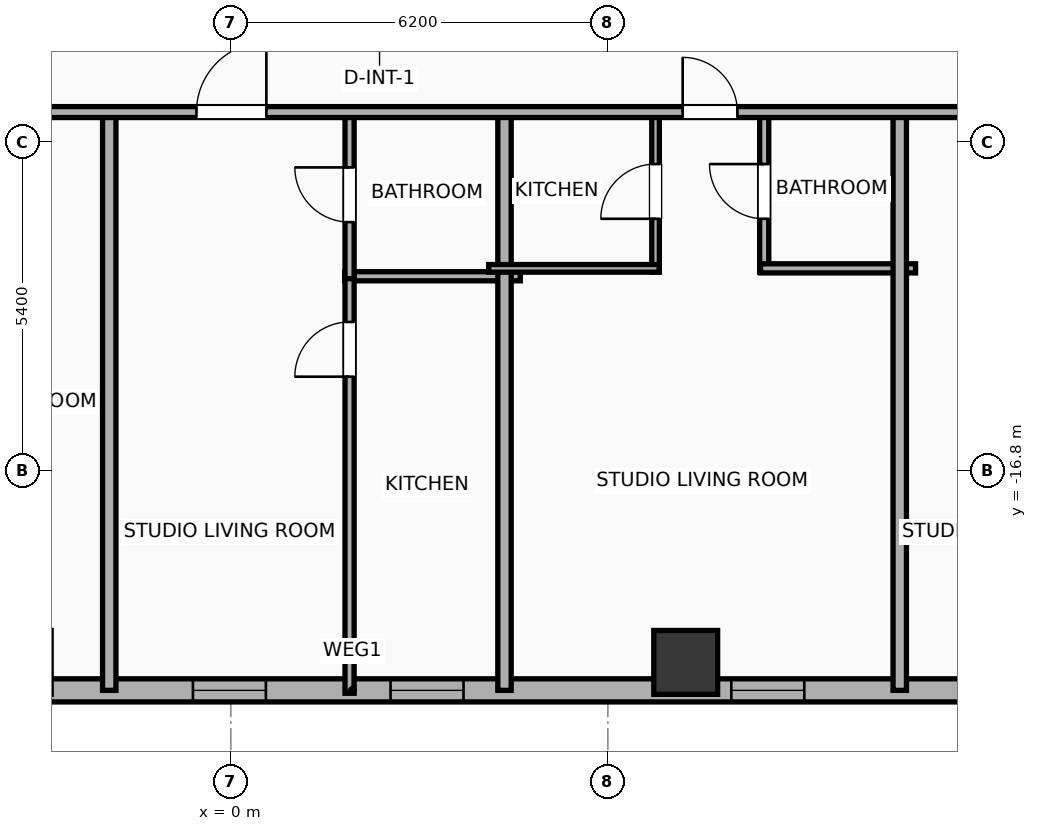
"""IFC4 building model, lengths in metres.
Left out: names, types, materials, properties, quantities, classifications, styles, units other than length and angle.
Written with IfcOpenShell. Run it as: python <this file> out.ifc"""

import sys

from ifc_helpers import new_model, si_unit, direction, frame, frame_2d, origin, origin_2d, place, context, subcontext, project, spatial, rectangle, hollow_rectangle, extrude, element, fill, save


model = new_model("IFC4")
c1 = context("Model", 3, precision=1e-05, world=origin(), true_north=direction((0.0, 1.0)))
c2 = subcontext(c1, "Body", "Model", "MODEL_VIEW")
j1 = project(units=[si_unit("LENGTHUNIT", "METRE"), si_unit("PLANEANGLEUNIT", "RADIAN")], contexts=[c1])
p1 = place(None, origin())
s1 = spatial("IfcSite", under=j1, at=p1, CompositionType="ELEMENT")
p2 = place(p1, origin())
s2 = spatial("IfcBuilding", under=s1, at=p2, CompositionType="ELEMENT")
p3 = place(p2, frame((0.0, 0.0, 89.7)))
s3 = spatial("IfcBuildingStorey", under=s2, at=p3, CompositionType="ELEMENT", Elevation=89.7)
p4 = place(p3, frame((7.48, -19.95, 0.0), z_axis=(0.0, 0.0, 1.0), x_axis=(1.0, 0.0, 0.0)))
e1 = element("IfcColumn", 1, at=p4, inside=s3, PredefinedType="COLUMN", context=c2, shape_type="SweptSolid", body=[
    extrude(hollow_rectangle(XDim=1.05, YDim=1.05, WallThickness=0.036, at=origin_2d()), origin(), (0.0, 0.0, 1.0), 3.9),
])
p5 = place(p3, frame((29.381, -20.41, 0.0), z_axis=(0.0, 0.0, 1.0), x_axis=(-1.0, 0.0, 0.0)))
e2 = element("IfcWall", 2, at=p5, inside=s3, PredefinedType="ELEMENTEDWALL", context=c2, shape_type="SweptSolid", body=[
    extrude(rectangle(XDim=54.763, YDim=0.38, at=frame_2d((27.381, 0.0))), origin(), (0.0, 0.0, 1.0), 2.54),
])
p6 = place(p5, frame((48.367, 0.0, 0.75)))
e3 = element("IfcOpeningElement", 3, at=p6, cuts=e2, PredefinedType="OPENING", context=c2, shape_type="SweptSolid", body=[
    extrude(rectangle(XDim=2.4, YDim=1.63, at=frame_2d((1.2, 0.815))), frame((0.0, 0.2, 0.0), z_axis=(0.0, -1.0, 0.0), x_axis=(1.0, 0.0, 0.0)), (0.0, 0.0, 1.0), 0.4),
])
p7 = place(p5, frame((52.081, 0.0, 0.75)))
e4 = element("IfcOpeningElement", 4, at=p7, cuts=e2, PredefinedType="OPENING", context=c2, shape_type="SweptSolid", body=[
    extrude(rectangle(XDim=1.2, YDim=1.63, at=frame_2d((0.6, 0.815))), frame((0.0, 0.2, 0.0), z_axis=(0.0, -1.0, 0.0), x_axis=(1.0, 0.0, 0.0)), (0.0, 0.0, 1.0), 0.4),
])
p8 = place(p5, frame((45.486, 0.0, 0.75)))
e5 = element("IfcOpeningElement", 5, at=p8, cuts=e2, PredefinedType="OPENING", context=c2, shape_type="SweptSolid", body=[
    extrude(rectangle(XDim=1.2, YDim=1.63, at=frame_2d((0.6, 0.815))), frame((0.0, 0.2, 0.0), z_axis=(0.0, -1.0, 0.0), x_axis=(1.0, 0.0, 0.0)), (0.0, 0.0, 1.0), 0.4),
])
p9 = place(p5, frame((40.531, 0.0, 0.75)))
e6 = element("IfcOpeningElement", 6, at=p9, cuts=e2, PredefinedType="OPENING", context=c2, shape_type="SweptSolid", body=[
    extrude(rectangle(XDim=1.2, YDim=1.63, at=frame_2d((0.6, 0.815))), frame((0.0, 0.2, 0.0), z_axis=(0.0, -1.0, 0.0), x_axis=(1.0, 0.0, 0.0)), (0.0, 0.0, 1.0), 0.4),
])
p10 = place(p5, frame((33.686, 0.0, 0.75)))
e7 = element("IfcOpeningElement", 7, at=p10, cuts=e2, PredefinedType="OPENING", context=c2, shape_type="SweptSolid", body=[
    extrude(rectangle(XDim=1.2, YDim=1.63, at=frame_2d((0.6, 0.815))), frame((0.0, 0.2, 0.0), z_axis=(0.0, -1.0, 0.0), x_axis=(1.0, 0.0, 0.0)), (0.0, 0.0, 1.0), 0.4),
])
p11 = place(p5, frame((35.976, 0.0, 0.75)))
e8 = element("IfcOpeningElement", 8, at=p11, cuts=e2, PredefinedType="OPENING", context=c2, shape_type="SweptSolid", body=[
    extrude(rectangle(XDim=1.2, YDim=1.63, at=frame_2d((0.6, 0.815))), frame((0.0, 0.2, 0.0), z_axis=(0.0, -1.0, 0.0), x_axis=(1.0, 0.0, 0.0)), (0.0, 0.0, 1.0), 0.4),
])
p12 = place(p5, frame((28.805, 0.0, 0.75)))
e9 = element("IfcOpeningElement", 9, at=p12, cuts=e2, PredefinedType="OPENING", context=c2, shape_type="SweptSolid", body=[
    extrude(rectangle(XDim=1.2, YDim=1.63, at=frame_2d((0.6, 0.815))), frame((0.0, 0.2, 0.0), z_axis=(0.0, -1.0, 0.0), x_axis=(1.0, 0.0, 0.0)), (0.0, 0.0, 1.0), 0.4),
])
p13 = place(p5, frame((25.555, 0.0, 0.75)))
e10 = element("IfcOpeningElement", 10, at=p13, cuts=e2, PredefinedType="OPENING", context=c2, shape_type="SweptSolid", body=[
    extrude(rectangle(XDim=1.2, YDim=1.63, at=frame_2d((0.6, 0.815))), frame((0.0, 0.2, 0.0), z_axis=(0.0, -1.0, 0.0), x_axis=(1.0, 0.0, 0.0)), (0.0, 0.0, 1.0), 0.4),
])
p14 = place(p5, frame((19.951, 0.0, 0.75)))
e11 = element("IfcOpeningElement", 11, at=p14, cuts=e2, PredefinedType="OPENING", context=c2, shape_type="SweptSolid", body=[
    extrude(rectangle(XDim=1.2, YDim=1.63, at=frame_2d((0.6, 0.815))), frame((0.0, 0.2, 0.0), z_axis=(0.0, -1.0, 0.0), x_axis=(1.0, 0.0, 0.0)), (0.0, 0.0, 1.0), 0.4),
])
p15 = place(p5, frame((16.008, 0.0, 0.75)))
e12 = element("IfcOpeningElement", 12, at=p15, cuts=e2, PredefinedType="OPENING", context=c2, shape_type="SweptSolid", body=[
    extrude(rectangle(XDim=1.2, YDim=1.63, at=frame_2d((0.6, 0.815))), frame((0.0, 0.2, 0.0), z_axis=(0.0, -1.0, 0.0), x_axis=(1.0, 0.0, 0.0)), (0.0, 0.0, 1.0), 0.4),
])
p16 = place(p5, frame((13.008, 0.0, 0.75)))
e13 = element("IfcOpeningElement", 13, at=p16, cuts=e2, PredefinedType="OPENING", context=c2, shape_type="SweptSolid", body=[
    extrude(rectangle(XDim=1.2, YDim=1.63, at=frame_2d((0.6, 0.815))), frame((0.0, 0.2, 0.0), z_axis=(0.0, -1.0, 0.0), x_axis=(1.0, 0.0, 0.0)), (0.0, 0.0, 1.0), 0.4),
])
p17 = place(p5, frame((8.948, 0.0, 0.75)))
e14 = element("IfcOpeningElement", 14, at=p17, cuts=e2, PredefinedType="OPENING", context=c2, shape_type="SweptSolid", body=[
    extrude(rectangle(XDim=1.2, YDim=1.63, at=frame_2d((0.6, 0.815))), frame((0.0, 0.2, 0.0), z_axis=(0.0, -1.0, 0.0), x_axis=(1.0, 0.0, 0.0)), (0.0, 0.0, 1.0), 0.4),
])
p18 = place(p5, frame((6.908, 0.0, 0.75)))
e15 = element("IfcOpeningElement", 15, at=p18, cuts=e2, PredefinedType="OPENING", context=c2, shape_type="SweptSolid", body=[
    extrude(rectangle(XDim=1.2, YDim=1.63, at=frame_2d((0.6, 0.815))), frame((0.0, 0.2, 0.0), z_axis=(0.0, -1.0, 0.0), x_axis=(1.0, 0.0, 0.0)), (0.0, 0.0, 1.0), 0.4),
])
p19 = place(p5, frame((1.695, 0.0, 0.75)))
e16 = element("IfcOpeningElement", 16, at=p19, cuts=e2, PredefinedType="OPENING", context=c2, shape_type="SweptSolid", body=[
    extrude(rectangle(XDim=1.2, YDim=1.63, at=frame_2d((0.6, 0.815))), frame((0.0, 0.2, 0.0), z_axis=(0.0, -1.0, 0.0), x_axis=(1.0, 0.0, 0.0)), (0.0, 0.0, 1.0), 0.4),
])
p20 = place(p5, frame((4.441, 0.0, 0.75)))
e17 = element("IfcOpeningElement", 17, at=p20, cuts=e2, PredefinedType="OPENING", context=c2, shape_type="SweptSolid", body=[
    extrude(rectangle(XDim=1.2, YDim=1.63, at=frame_2d((0.6, 0.815))), frame((0.0, 0.2, 0.0), z_axis=(0.0, -1.0, 0.0), x_axis=(1.0, 0.0, 0.0)), (0.0, 0.0, 1.0), 0.4),
])
p21 = place(p3, frame((-2.0, -20.41, 0.0), z_axis=(0.0, 0.0, 1.0), x_axis=(0.0, 1.0, 0.0)))
e18 = element("IfcWall", 18, at=p21, inside=s3, PredefinedType="PARTITIONING", context=c2, shape_type="SweptSolid", body=[
    extrude(rectangle(XDim=9.59, YDim=0.22, at=frame_2d((4.795, 0.0))), origin(), (0.0, 0.0, 1.0), 3.65),
])
p22 = place(p3, frame((1.872, -13.6, 0.0), z_axis=(0.0, 0.0, 1.0), x_axis=(1.0, 0.0, 0.0)))
e19 = element("IfcWall", 19, at=p22, inside=s3, PredefinedType="PLUMBINGWALL", context=c2, shape_type="SweptSolid", body=[
    extrude(rectangle(XDim=2.888, YDim=0.15, at=frame_2d((1.444, 0.0))), origin(), (0.0, 0.0, 1.0), 3.65),
])
p23 = place(p3, frame((1.952, -20.458, 0.0), z_axis=(0.0, 0.0, 1.0), x_axis=(0.0, 1.0, 0.0)))
e20 = element("IfcWall", 20, at=p23, inside=s3, PredefinedType="PLUMBINGWALL", context=c2, shape_type="SweptSolid", body=[
    extrude(rectangle(XDim=6.897, YDim=0.15, at=frame_2d((3.449, 0.0))), origin(), (0.0, 0.0, 1.0), 3.65),
])
p24 = place(p23, frame((5.206, 0.0, 0.0)))
e21 = element("IfcOpeningElement", 21, at=p24, cuts=e20, PredefinedType="OPENING", context=c2, shape_type="SweptSolid", body=[
    extrude(rectangle(XDim=0.9, YDim=2.05, at=frame_2d((0.45, 1.025))), frame((0.0, 0.085, 0.0), z_axis=(0.0, -1.0, 0.0), x_axis=(1.0, 0.0, 0.0)), (0.0, 0.0, 1.0), 0.17),
])
p25 = place(p3, frame((1.952, -13.64, 0.0), z_axis=(0.0, 0.0, 1.0), x_axis=(0.0, 1.0, 0.0)))
e22 = element("IfcWall", 22, at=p25, inside=s3, PredefinedType="PLUMBINGWALL", context=c2, shape_type="SweptSolid", body=[
    extrude(rectangle(XDim=2.76, YDim=0.15, at=frame_2d((1.38, 0.0))), origin(), (0.0, 0.0, 1.0), 3.65),
])
p26 = place(p25, frame((0.93, 0.0, 0.0)))
e23 = element("IfcOpeningElement", 23, at=p26, cuts=e22, PredefinedType="OPENING", context=c2, shape_type="SweptSolid", body=[
    extrude(rectangle(XDim=0.9, YDim=2.05, at=frame_2d((0.45, 1.025))), frame((0.0, 0.085, 0.0), z_axis=(0.0, -1.0, 0.0), x_axis=(1.0, 0.0, 0.0)), (0.0, 0.0, 1.0), 0.17),
])
p27 = place(p3, frame((4.5, -20.41, 0.0), z_axis=(0.0, 0.0, 1.0), x_axis=(0.0, 1.0, 0.0)))
e24 = element("IfcWall", 24, at=p27, inside=s3, PredefinedType="PARTITIONING", context=c2, shape_type="SweptSolid", body=[
    extrude(rectangle(XDim=9.59, YDim=0.22, at=frame_2d((4.795, 0.0))), origin(), (0.0, 0.0, 1.0), 3.65),
])
p28 = place(p3, frame((6.984, -13.53, 0.0), z_axis=(0.0, 0.0, 1.0), x_axis=(0.0, 1.0, 0.0)))
e25 = element("IfcWall", 25, at=p28, inside=s3, PredefinedType="PARTITIONING", context=c2, shape_type="SweptSolid", body=[
    extrude(rectangle(XDim=2.65, YDim=0.125, at=frame_2d((1.325, 0.0))), origin(), (0.0, 0.0, 1.0), 3.65),
])
p29 = place(p28, frame((0.875, 0.0, 0.0)))
e26 = element("IfcOpeningElement", 26, at=p29, cuts=e25, PredefinedType="OPENING", context=c2, shape_type="SweptSolid", body=[
    extrude(rectangle(XDim=0.9, YDim=2.05, at=frame_2d((0.45, 1.025))), frame((0.0, 0.073, 0.0), z_axis=(0.0, -1.0, 0.0), x_axis=(1.0, 0.0, 0.0)), (0.0, 0.0, 1.0), 0.145),
])
p30 = place(p3, frame((8.771, -13.53, 0.0), z_axis=(0.0, 0.0, 1.0), x_axis=(0.0, 1.0, 0.0)))
e27 = element("IfcWall", 27, at=p30, inside=s3, PredefinedType="PLUMBINGWALL", context=c2, shape_type="SweptSolid", body=[
    extrude(rectangle(XDim=2.65, YDim=0.15, at=frame_2d((1.325, 0.0))), origin(), (0.0, 0.0, 1.0), 3.65),
])
p31 = place(p30, frame((0.875, 0.0, 0.0)))
e28 = element("IfcOpeningElement", 28, at=p31, cuts=e27, PredefinedType="OPENING", context=c2, shape_type="SweptSolid", body=[
    extrude(rectangle(XDim=0.9, YDim=2.05, at=frame_2d((0.45, 1.025))), frame((0.0, 0.085, 0.0), z_axis=(0.0, -1.0, 0.0), x_axis=(1.0, 0.0, 0.0)), (0.0, 0.0, 1.0), 0.17),
])
p32 = place(p3, frame((4.24, -13.47, 0.0), z_axis=(0.0, 0.0, 1.0), x_axis=(1.0, 0.0, 0.0)))
e29 = element("IfcWall", 29, at=p32, inside=s3, PredefinedType="PARTITIONING", context=c2, shape_type="SweptSolid", body=[
    extrude(rectangle(XDim=2.804, YDim=0.125, at=frame_2d((1.402, 0.0))), origin(), (0.0, 0.0, 1.0), 3.65),
])
p33 = place(p3, frame((8.711, -13.47, 0.0), z_axis=(0.0, 0.0, 1.0), x_axis=(1.0, 0.0, 0.0)))
e30 = element("IfcWall", 30, at=p33, inside=s3, PredefinedType="PLUMBINGWALL", context=c2, shape_type="SweptSolid", body=[
    extrude(rectangle(XDim=2.549, YDim=0.15, at=frame_2d((1.274, 0.0))), origin(), (0.0, 0.0, 1.0), 3.65),
])
p34 = place(p3, frame((11.0, -20.41, 0.0), z_axis=(0.0, 0.0, 1.0), x_axis=(0.0, 1.0, 0.0)))
e31 = element("IfcWall", 31, at=p34, inside=s3, PredefinedType="PARTITIONING", context=c2, shape_type="SweptSolid", body=[
    extrude(rectangle(XDim=9.59, YDim=0.22, at=frame_2d((4.795, 0.0))), origin(), (0.0, 0.0, 1.0), 3.65),
])
p35 = place(p3, frame((-29.21, -10.9, 0.0), z_axis=(0.0, 0.0, 1.0), x_axis=(1.0, 0.0, 0.0)))
e32 = element("IfcWall", 32, at=p35, inside=s3, PredefinedType="PARTITIONING", context=c2, shape_type="SweptSolid", body=[
    extrude(rectangle(XDim=62.42, YDim=0.18, at=frame_2d((31.21, 0.0))), origin(), (0.0, 0.0, 1.0), 3.65),
])
p36 = place(p35, frame((3.108, 0.0, 0.0)))
e33 = element("IfcOpeningElement", 33, at=p36, cuts=e32, PredefinedType="OPENING", context=c2, shape_type="SweptSolid", body=[
    extrude(rectangle(XDim=1.15, YDim=2.05, at=frame_2d((0.575, 1.025))), frame((0.0, 0.1, 0.0), z_axis=(0.0, -1.0, 0.0), x_axis=(1.0, 0.0, 0.0)), (0.0, 0.0, 1.0), 0.2),
])
p37 = place(p35, frame((10.242, 0.0, 0.0)))
e34 = element("IfcOpeningElement", 34, at=p37, cuts=e32, PredefinedType="OPENING", context=c2, shape_type="SweptSolid", body=[
    extrude(rectangle(XDim=1.15, YDim=2.05, at=frame_2d((0.575, 1.025))), frame((0.0, 0.1, 0.0), z_axis=(0.0, -1.0, 0.0), x_axis=(1.0, 0.0, 0.0)), (0.0, 0.0, 1.0), 0.2),
])
p38 = place(p35, frame((17.14, 0.0, 0.0)))
e35 = element("IfcOpeningElement", 35, at=p38, cuts=e32, PredefinedType="OPENING", context=c2, shape_type="SweptSolid", body=[
    extrude(rectangle(XDim=0.9, YDim=2.05, at=frame_2d((0.45, 1.025))), frame((0.0, 0.1, 0.0), z_axis=(0.0, -1.0, 0.0), x_axis=(1.0, 0.0, 0.0)), (0.0, 0.0, 1.0), 0.2),
])
p39 = place(p35, frame((24.661, 0.0, 0.0)))
e36 = element("IfcOpeningElement", 36, at=p39, cuts=e32, PredefinedType="OPENING", context=c2, shape_type="SweptSolid", body=[
    extrude(rectangle(XDim=1.15, YDim=2.05, at=frame_2d((0.575, 1.025))), frame((0.0, 0.1, 0.0), z_axis=(0.0, -1.0, 0.0), x_axis=(1.0, 0.0, 0.0)), (0.0, 0.0, 1.0), 0.2),
])
p40 = place(p35, frame((28.644, 0.0, 0.0)))
e37 = element("IfcOpeningElement", 37, at=p40, cuts=e32, PredefinedType="OPENING", context=c2, shape_type="SweptSolid", body=[
    extrude(rectangle(XDim=1.15, YDim=2.05, at=frame_2d((0.575, 1.025))), frame((0.0, 0.1, 0.0), z_axis=(0.0, -1.0, 0.0), x_axis=(1.0, 0.0, 0.0)), (0.0, 0.0, 1.0), 0.2),
])
p41 = place(p35, frame((36.64, 0.0, 0.0)))
e38 = element("IfcOpeningElement", 38, at=p41, cuts=e32, PredefinedType="OPENING", context=c2, shape_type="SweptSolid", body=[
    extrude(rectangle(XDim=0.9, YDim=2.05, at=frame_2d((0.45, 1.025))), frame((0.0, 0.1, 0.0), z_axis=(0.0, -1.0, 0.0), x_axis=(1.0, 0.0, 0.0)), (0.0, 0.0, 1.0), 0.2),
])
p42 = place(p35, frame((41.44, 0.0, 0.0)))
e39 = element("IfcOpeningElement", 39, at=p42, cuts=e32, PredefinedType="OPENING", context=c2, shape_type="SweptSolid", body=[
    extrude(rectangle(XDim=1.15, YDim=2.05, at=frame_2d((0.575, 1.025))), frame((0.0, 0.1, 0.0), z_axis=(0.0, -1.0, 0.0), x_axis=(1.0, 0.0, 0.0)), (0.0, 0.0, 1.0), 0.2),
])
p43 = place(p35, frame((47.538, 0.0, 0.0)))
e40 = element("IfcOpeningElement", 40, at=p43, cuts=e32, PredefinedType="OPENING", context=c2, shape_type="SweptSolid", body=[
    extrude(rectangle(XDim=1.15, YDim=2.05, at=frame_2d((0.575, 1.025))), frame((0.0, 0.1, 0.0), z_axis=(0.0, -1.0, 0.0), x_axis=(1.0, 0.0, 0.0)), (0.0, 0.0, 1.0), 0.2),
])
p44 = place(p35, frame((57.157, 0.0, 0.0)))
e41 = element("IfcOpeningElement", 41, at=p44, cuts=e32, PredefinedType="OPENING", context=c2, shape_type="SweptSolid", body=[
    extrude(rectangle(XDim=1.15, YDim=2.05, at=frame_2d((0.575, 1.025))), frame((0.0, 0.1, 0.0), z_axis=(0.0, -1.0, 0.0), x_axis=(1.0, 0.0, 0.0)), (0.0, 0.0, 1.0), 0.2),
])
p45 = place(p12, origin())
e42 = element("IfcWindow", 42, at=p45, inside=s3, PartitioningType="SINGLE_PANEL", PredefinedType="WINDOW", context=c2, shape_type="SweptSolid", body=[
    extrude(rectangle(XDim=1.2, YDim=1.63, at=frame_2d((0.6, 0.815))), frame((0.0, 0.03, 0.0), z_axis=(0.0, -1.0, 0.0), x_axis=(1.0, 0.0, 0.0)), (0.0, 0.0, 1.0), 0.06),
])
fill(e9, e42)
p46 = place(p13, origin())
e43 = element("IfcWindow", 43, at=p46, inside=s3, PartitioningType="SINGLE_PANEL", PredefinedType="WINDOW", context=c2, shape_type="SweptSolid", body=[
    extrude(rectangle(XDim=1.2, YDim=1.63, at=frame_2d((0.6, 0.815))), frame((0.0, 0.03, 0.0), z_axis=(0.0, -1.0, 0.0), x_axis=(1.0, 0.0, 0.0)), (0.0, 0.0, 1.0), 0.06),
])
fill(e10, e43)
p47 = place(p14, origin())
e44 = element("IfcWindow", 44, at=p47, inside=s3, PartitioningType="SINGLE_PANEL", PredefinedType="WINDOW", context=c2, shape_type="SweptSolid", body=[
    extrude(rectangle(XDim=1.2, YDim=1.63, at=frame_2d((0.6, 0.815))), frame((0.0, 0.03, 0.0), z_axis=(0.0, -1.0, 0.0), x_axis=(1.0, 0.0, 0.0)), (0.0, 0.0, 1.0), 0.06),
])
fill(e11, e44)
p48 = place(p24, origin())
e45 = element("IfcDoor", 45, at=p48, inside=s3, OperationType="SINGLE_SWING_LEFT", PredefinedType="DOOR", context=c2, shape_type="SweptSolid", body=[
    extrude(rectangle(XDim=0.9, YDim=2.05, at=frame_2d((0.45, 1.025))), frame((0.0, 0.025, 0.0), z_axis=(0.0, -1.0, 0.0), x_axis=(1.0, 0.0, 0.0)), (0.0, 0.0, 1.0), 0.05),
])
fill(e21, e45)
p49 = place(p26, origin())
e46 = element("IfcDoor", 46, at=p49, inside=s3, OperationType="SINGLE_SWING_RIGHT", PredefinedType="DOOR", context=c2, shape_type="SweptSolid", body=[
    extrude(rectangle(XDim=0.9, YDim=2.05, at=frame_2d((0.45, 1.025))), frame((0.0, 0.025, 0.0), z_axis=(0.0, -1.0, 0.0), x_axis=(1.0, 0.0, 0.0)), (0.0, 0.0, 1.0), 0.05),
])
fill(e23, e46)
p50 = place(p29, origin())
e47 = element("IfcDoor", 47, at=p50, inside=s3, OperationType="SINGLE_SWING_LEFT", PredefinedType="DOOR", context=c2, shape_type="SweptSolid", body=[
    extrude(rectangle(XDim=0.9, YDim=2.05, at=frame_2d((0.45, 1.025))), frame((0.0, 0.025, 0.0), z_axis=(0.0, -1.0, 0.0), x_axis=(1.0, 0.0, 0.0)), (0.0, 0.0, 1.0), 0.05),
])
fill(e26, e47)
p51 = place(p31, origin())
e48 = element("IfcDoor", 48, at=p51, inside=s3, OperationType="SINGLE_SWING_RIGHT", PredefinedType="DOOR", context=c2, shape_type="SweptSolid", body=[
    extrude(rectangle(XDim=0.9, YDim=2.05, at=frame_2d((0.45, 1.025))), frame((0.0, 0.025, 0.0), z_axis=(0.0, -1.0, 0.0), x_axis=(1.0, 0.0, 0.0)), (0.0, 0.0, 1.0), 0.05),
])
fill(e28, e48)
p52 = place(p40, origin())
e49 = element("IfcDoor", 49, at=p52, inside=s3, OperationType="SINGLE_SWING_RIGHT", PredefinedType="DOOR", context=c2, shape_type="SweptSolid", body=[
    extrude(rectangle(XDim=1.15, YDim=2.05, at=frame_2d((0.575, 1.025))), frame((0.0, 0.025, 0.0), z_axis=(0.0, -1.0, 0.0), x_axis=(1.0, 0.0, 0.0)), (0.0, 0.0, 1.0), 0.05),
])
fill(e37, e49)
p53 = place(p41, origin())
e50 = element("IfcDoor", 50, at=p53, inside=s3, OperationType="SINGLE_SWING_LEFT", PredefinedType="DOOR", context=c2, shape_type="SweptSolid", body=[
    extrude(rectangle(XDim=0.9, YDim=2.05, at=frame_2d((0.45, 1.025))), frame((0.0, 0.025, 0.0), z_axis=(0.0, -1.0, 0.0), x_axis=(1.0, 0.0, 0.0)), (0.0, 0.0, 1.0), 0.05),
])
fill(e38, e50)
save(model, sys.argv[1])
